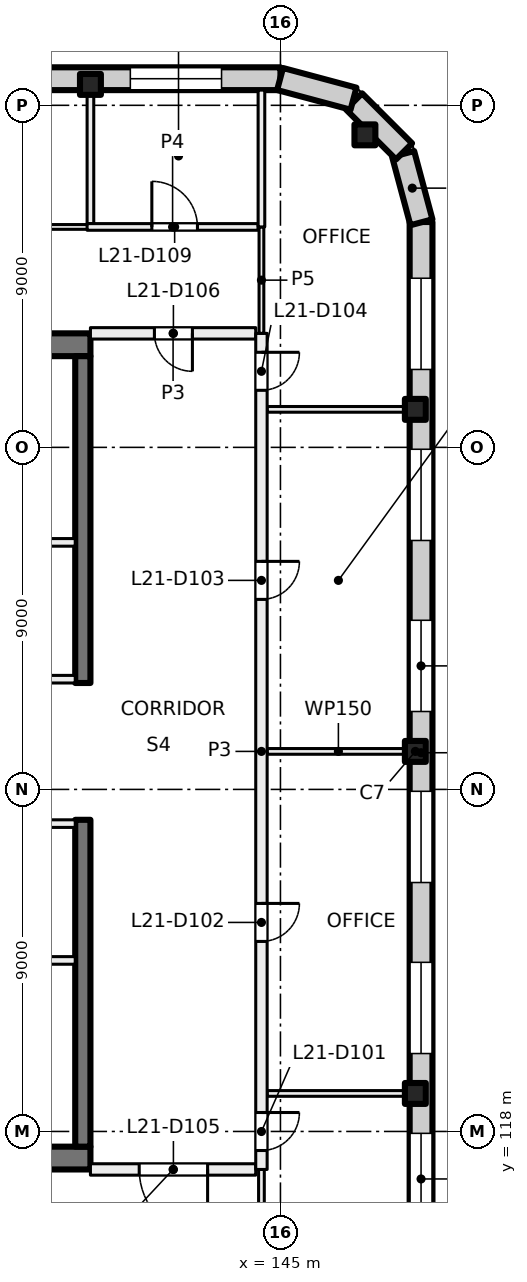
"""IFC4 building model, lengths in metres.
Left out: names, types, materials, properties, quantities, classifications, styles, units other than length and angle.
Written with IfcOpenShell. Run it as: python <this file> out.ifc"""

import sys

from ifc_helpers import new_model, si_unit, direction, frame, frame_2d, origin, origin_2d, place, context, subcontext, project, spatial, rectangle, extrude, element, fill, save


model = new_model("IFC4")
c1 = context("Model", 3, precision=1e-05, world=origin(), true_north=direction((0.0, 1.0)))
c2 = subcontext(c1, "Body", "Model", "MODEL_VIEW")
j1 = project(units=[si_unit("LENGTHUNIT", "METRE"), si_unit("PLANEANGLEUNIT", "RADIAN")], contexts=[c1])
p1 = place(None, origin())
s1 = spatial("IfcSite", under=j1, at=p1, CompositionType="ELEMENT")
p2 = place(p1, origin())
s2 = spatial("IfcBuilding", under=s1, at=p2, CompositionType="ELEMENT")
p3 = place(p2, frame((0.0, 0.0, 93.0)))
s3 = spatial("IfcBuildingStorey", under=s2, at=p3, CompositionType="ELEMENT", Elevation=93.0)
for number, where, z_axis, x_axis in (
    (1, (148.55, 119.0, 0.0), (0.0, 0.0, 1.0), (1.0, 0.0, 0.0)),
    (2, (148.55, 128.0, 0.0), (0.0, 0.0, 1.0), (1.0, 0.0, 0.0)),
    (3, (148.55, 137.0, 0.0), (0.0, 0.0, 1.0), (1.0, 0.0, 0.0)),
    (4, (140.0, 145.55, 0.0), (0.0, 0.0, 1.0), (1.0, 0.0, 0.0)),
    (5, (147.223, 144.223, 0.0), (0.0, 0.0, 1.0), (1.0, 0.0, 0.0)),
):
    element("IfcColumn", number, at=place(p3, frame(where, z_axis=z_axis, x_axis=x_axis)), inside=s3, PredefinedType="COLUMN", context=c2, shape_type="SweptSolid", body=[
        extrude(rectangle(XDim=0.55, YDim=0.55, at=origin_2d()), origin(), (0.0, 0.0, 1.0), 4.0),
    ])
for number, where, z_axis, x_axis in (
    (6, (135.4, 117.3, 0.0), (0.0, 0.0, 1.0), (1.0, 0.0, 0.0)),
    (7, (135.4, 138.7, 0.0), (0.0, 0.0, 1.0), (1.0, 0.0, 0.0)),
):
    element("IfcWall", number, at=place(p3, frame(where, z_axis=z_axis, x_axis=x_axis)), inside=s3, PredefinedType="SHEAR", context=c2, shape_type="SweptSolid", body=[
        extrude(rectangle(XDim=4.6, YDim=0.6, at=frame_2d((2.3, 0.0))), origin(), (0.0, 0.0, 1.0), 4.0),
    ])
for number, where, z_axis, x_axis in (
    (8, (139.8, 117.6, 0.0), (0.0, 0.0, 1.0), (0.0, 1.0, 0.0)),
    (9, (139.8, 129.8, 0.0), (0.0, 0.0, 1.0), (0.0, 1.0, 0.0)),
):
    element("IfcWall", number, at=place(p3, frame(where, z_axis=z_axis, x_axis=x_axis)), inside=s3, PredefinedType="SHEAR", context=c2, shape_type="SweptSolid", body=[
        extrude(rectangle(XDim=8.6, YDim=0.4, at=frame_2d((4.3, 0.0))), origin(), (0.0, 0.0, 1.0), 4.0),
    ])
p4 = place(p3, frame((131.07, 145.7, 0.0), z_axis=(0.0, 0.0, 1.0), x_axis=(1.0, 0.0, 0.0)))
e10 = element("IfcWall", 10, at=p4, inside=s3, PredefinedType="SOLIDWALL", context=c2, shape_type="SweptSolid", body=[
    extrude(rectangle(XDim=13.93, YDim=0.6, at=frame_2d((6.965, 0.0))), origin(), (0.0, 0.0, 1.0), 3.625),
])
p5 = place(p4, frame((0.98, 0.0, 0.9)))
e11 = element("IfcOpeningElement", 11, at=p5, cuts=e10, PredefinedType="OPENING", context=c2, shape_type="SweptSolid", body=[
    extrude(rectangle(XDim=2.4, YDim=2.4, at=frame_2d((1.2, 1.2))), frame((0.0, 0.31, 0.0), z_axis=(0.0, -1.0, 0.0), x_axis=(1.0, 0.0, 0.0)), (0.0, 0.0, 1.0), 0.62),
])
p6 = place(p4, frame((5.48, 0.0, 0.9)))
e12 = element("IfcOpeningElement", 12, at=p6, cuts=e10, PredefinedType="OPENING", context=c2, shape_type="SweptSolid", body=[
    extrude(rectangle(XDim=2.4, YDim=2.4, at=frame_2d((1.2, 1.2))), frame((0.0, 0.31, 0.0), z_axis=(0.0, -1.0, 0.0), x_axis=(1.0, 0.0, 0.0)), (0.0, 0.0, 1.0), 0.62),
])
p7 = place(p4, frame((9.98, 0.0, 0.9)))
e13 = element("IfcOpeningElement", 13, at=p7, cuts=e10, PredefinedType="OPENING", context=c2, shape_type="SweptSolid", body=[
    extrude(rectangle(XDim=2.4, YDim=2.4, at=frame_2d((1.2, 1.2))), frame((0.0, 0.31, 0.0), z_axis=(0.0, -1.0, 0.0), x_axis=(1.0, 0.0, 0.0)), (0.0, 0.0, 1.0), 0.62),
])
p8 = place(p3, frame((148.7, 141.93, 0.0), z_axis=(0.0, 0.0, 1.0), x_axis=(0.0, -1.0, 0.0)))
e14 = element("IfcWall", 14, at=p8, inside=s3, PredefinedType="SOLIDWALL", context=c2, shape_type="SweptSolid", body=[
    extrude(rectangle(XDim=27.93, YDim=0.6, at=frame_2d((13.965, 0.0))), origin(), (0.0, 0.0, 1.0), 3.625),
])
p9 = place(p8, frame((1.48, 0.0, 0.9)))
e15 = element("IfcOpeningElement", 15, at=p9, cuts=e14, PredefinedType="OPENING", context=c2, shape_type="SweptSolid", body=[
    extrude(rectangle(XDim=2.4, YDim=2.4, at=frame_2d((1.2, 1.2))), frame((0.0, 0.31, 0.0), z_axis=(0.0, -1.0, 0.0), x_axis=(1.0, 0.0, 0.0)), (0.0, 0.0, 1.0), 0.62),
])
p10 = place(p8, frame((5.98, 0.0, 0.9)))
e16 = element("IfcOpeningElement", 16, at=p10, cuts=e14, PredefinedType="OPENING", context=c2, shape_type="SweptSolid", body=[
    extrude(rectangle(XDim=2.4, YDim=2.4, at=frame_2d((1.2, 1.2))), frame((0.0, 0.31, 0.0), z_axis=(0.0, -1.0, 0.0), x_axis=(1.0, 0.0, 0.0)), (0.0, 0.0, 1.0), 0.62),
])
p11 = place(p8, frame((10.48, 0.0, 0.9)))
e17 = element("IfcOpeningElement", 17, at=p11, cuts=e14, PredefinedType="OPENING", context=c2, shape_type="SweptSolid", body=[
    extrude(rectangle(XDim=2.4, YDim=2.4, at=frame_2d((1.2, 1.2))), frame((0.0, 0.31, 0.0), z_axis=(0.0, -1.0, 0.0), x_axis=(1.0, 0.0, 0.0)), (0.0, 0.0, 1.0), 0.62),
])
p12 = place(p8, frame((14.98, 0.0, 0.9)))
e18 = element("IfcOpeningElement", 18, at=p12, cuts=e14, PredefinedType="OPENING", context=c2, shape_type="SweptSolid", body=[
    extrude(rectangle(XDim=2.4, YDim=2.4, at=frame_2d((1.2, 1.2))), frame((0.0, 0.31, 0.0), z_axis=(0.0, -1.0, 0.0), x_axis=(1.0, 0.0, 0.0)), (0.0, 0.0, 1.0), 0.62),
])
p13 = place(p8, frame((19.48, 0.0, 0.9)))
e19 = element("IfcOpeningElement", 19, at=p13, cuts=e14, PredefinedType="OPENING", context=c2, shape_type="SweptSolid", body=[
    extrude(rectangle(XDim=2.4, YDim=2.4, at=frame_2d((1.2, 1.2))), frame((0.0, 0.31, 0.0), z_axis=(0.0, -1.0, 0.0), x_axis=(1.0, 0.0, 0.0)), (0.0, 0.0, 1.0), 0.62),
])
p14 = place(p8, frame((23.98, 0.0, 0.9)))
e20 = element("IfcOpeningElement", 20, at=p14, cuts=e14, PredefinedType="OPENING", context=c2, shape_type="SweptSolid", body=[
    extrude(rectangle(XDim=2.4, YDim=2.4, at=frame_2d((1.2, 1.2))), frame((0.0, 0.31, 0.0), z_axis=(0.0, -1.0, 0.0), x_axis=(1.0, 0.0, 0.0)), (0.0, 0.0, 1.0), 0.62),
])
for number, where, z_axis, x_axis in (
    (21, (148.229, 143.719, 0.0), (0.0, 0.0, 1.0), (0.259, -0.966, 0.0)),
    (22, (146.936, 145.104, 0.0), (0.0, 0.0, 1.0), (0.707, -0.707, 0.0)),
):
    element("IfcWall", number, at=place(p3, frame(where, z_axis=z_axis, x_axis=x_axis)), inside=s3, PredefinedType="SOLIDWALL", context=c2, shape_type="SweptSolid", body=[
        extrude(rectangle(XDim=1.861, YDim=0.6, at=frame_2d((0.93, 0.0))), origin(), (0.0, 0.0, 1.0), 3.625),
    ])
p15 = place(p3, frame((144.99, 145.692, 0.0), z_axis=(0.0, 0.0, 1.0), x_axis=(0.965920269068, -0.258839784042, 0.0)))
e23 = element("IfcWall", 23, at=p15, inside=s3, PredefinedType="SOLIDWALL", context=c2, shape_type="SweptSolid", body=[
    extrude(rectangle(XDim=2.0, YDim=0.6, at=frame_2d((1.0, 0.0))), origin(), (0.0, 0.0, 1.0), 3.625),
])
p16 = place(p3, frame((135.0, 129.9, 0.0), z_axis=(0.0, 0.0, 1.0), x_axis=(1.0, 0.0, 0.0)))
e24 = element("IfcWall", 24, at=p16, inside=s3, PredefinedType="PARTITIONING", context=c2, shape_type="SweptSolid", body=[
    extrude(rectangle(XDim=4.6, YDim=0.2, at=frame_2d((2.3, 0.0))), origin(), (0.0, 0.0, 1.0), 3.625),
])
p17 = place(p16, frame((1.7, 0.0, 0.0)))
e25 = element("IfcOpeningElement", 25, at=p17, cuts=e24, PredefinedType="OPENING", context=c2, shape_type="SweptSolid", body=[
    extrude(rectangle(XDim=1.2, YDim=2.1, at=frame_2d((0.6, 1.05))), frame((0.0, 0.11, 0.0), z_axis=(0.0, -1.0, 0.0), x_axis=(1.0, 0.0, 0.0)), (0.0, 0.0, 1.0), 0.22),
])
p18 = place(p3, frame((135.0, 133.5, 0.0), z_axis=(0.0, 0.0, 1.0), x_axis=(1.0, 0.0, 0.0)))
e26 = element("IfcWall", 26, at=p18, inside=s3, PredefinedType="PARTITIONING", context=c2, shape_type="SweptSolid", body=[
    extrude(rectangle(XDim=4.6, YDim=0.2, at=frame_2d((2.3, 0.0))), origin(), (0.0, 0.0, 1.0), 3.625),
])
p19 = place(p18, frame((1.75, 0.0, 0.0)))
e27 = element("IfcOpeningElement", 27, at=p19, cuts=e26, PredefinedType="OPENING", context=c2, shape_type="SweptSolid", body=[
    extrude(rectangle(XDim=1.5, YDim=2.1, at=frame_2d((0.75, 1.05))), frame((0.0, 0.11, 0.0), z_axis=(0.0, -1.0, 0.0), x_axis=(1.0, 0.0, 0.0)), (0.0, 0.0, 1.0), 0.22),
])
p20 = place(p3, frame((139.6, 126.1, 0.0), z_axis=(0.0, 0.0, 1.0), x_axis=(-1.0, 0.0, 0.0)))
e28 = element("IfcWall", 28, at=p20, inside=s3, PredefinedType="PARTITIONING", context=c2, shape_type="SweptSolid", body=[
    extrude(rectangle(XDim=4.6, YDim=0.2, at=frame_2d((2.3, 0.0))), origin(), (0.0, 0.0, 1.0), 3.625),
])
p21 = place(p20, frame((1.7, 0.0, 0.0)))
e29 = element("IfcOpeningElement", 29, at=p21, cuts=e28, PredefinedType="OPENING", context=c2, shape_type="SweptSolid", body=[
    extrude(rectangle(XDim=1.2, YDim=2.1, at=frame_2d((0.6, 1.05))), frame((0.0, 0.11, 0.0), z_axis=(0.0, -1.0, 0.0), x_axis=(1.0, 0.0, 0.0)), (0.0, 0.0, 1.0), 0.22),
])
p22 = place(p3, frame((139.6, 122.5, 0.0), z_axis=(0.0, 0.0, 1.0), x_axis=(-1.0, 0.0, 0.0)))
e30 = element("IfcWall", 30, at=p22, inside=s3, PredefinedType="PARTITIONING", context=c2, shape_type="SweptSolid", body=[
    extrude(rectangle(XDim=4.6, YDim=0.2, at=frame_2d((2.3, 0.0))), origin(), (0.0, 0.0, 1.0), 3.625),
])
p23 = place(p22, frame((1.35, 0.0, 0.0)))
e31 = element("IfcOpeningElement", 31, at=p23, cuts=e30, PredefinedType="OPENING", context=c2, shape_type="SweptSolid", body=[
    extrude(rectangle(XDim=1.5, YDim=2.1, at=frame_2d((0.75, 1.05))), frame((0.0, 0.11, 0.0), z_axis=(0.0, -1.0, 0.0), x_axis=(1.0, 0.0, 0.0)), (0.0, 0.0, 1.0), 0.22),
])
p24 = place(p3, frame((131.085, 141.8, 0.0), z_axis=(0.0, 0.0, 1.0), x_axis=(1.0, 0.0, 0.0)))
e32 = element("IfcWall", 32, at=p24, inside=s3, PredefinedType="PARTITIONING", context=c2, shape_type="SweptSolid", body=[
    extrude(rectangle(XDim=8.918, YDim=0.125, at=frame_2d((4.459, 0.0))), origin(), (0.0, 0.0, 1.0), 3.625),
])
p25 = place(p24, frame((6.165, 0.0, 0.0)))
e33 = element("IfcOpeningElement", 33, at=p25, cuts=e32, PredefinedType="OPENING", context=c2, shape_type="SweptSolid", body=[
    extrude(rectangle(XDim=1.0, YDim=2.1, at=frame_2d((0.5, 1.05))), frame((0.0, 0.073, 0.0), z_axis=(0.0, -1.0, 0.0), x_axis=(1.0, 0.0, 0.0)), (0.0, 0.0, 1.0), 0.145),
])
p26 = place(p24, frame((1.798, 0.0, 0.0)))
e34 = element("IfcOpeningElement", 34, at=p26, cuts=e32, PredefinedType="OPENING", context=c2, shape_type="SweptSolid", body=[
    extrude(rectangle(XDim=0.8, YDim=2.1, at=frame_2d((0.4, 1.05))), frame((0.0, 0.073, 0.0), z_axis=(0.0, -1.0, 0.0), x_axis=(1.0, 0.0, 0.0)), (0.0, 0.0, 1.0), 0.145),
])
p27 = place(p3, frame((144.35, 139.0, 0.0), z_axis=(0.0, 0.0, 1.0), x_axis=(-1.0, 0.0, 0.0)))
e35 = element("IfcWall", 35, at=p27, inside=s3, PredefinedType="PARTITIONING", context=c2, shape_type="SweptSolid", body=[
    extrude(rectangle(XDim=4.35, YDim=0.3, at=frame_2d((2.175, 0.0))), origin(), (0.0, 0.0, 1.0), 3.625),
])
p28 = place(p27, frame((1.667, 0.0, 0.0)))
e36 = element("IfcOpeningElement", 36, at=p28, cuts=e35, PredefinedType="OPENING", context=c2, shape_type="SweptSolid", body=[
    extrude(rectangle(XDim=1.0, YDim=2.1, at=frame_2d((0.5, 1.05))), frame((0.0, 0.16, 0.0), z_axis=(0.0, -1.0, 0.0), x_axis=(1.0, 0.0, 0.0)), (0.0, 0.0, 1.0), 0.32),
])
p29 = place(p3, frame((140.0, 141.888, 0.0), z_axis=(0.0, 0.0, 1.0), x_axis=(0.0, 1.0, 0.0)))
e37 = element("IfcWall", 37, at=p29, inside=s3, PredefinedType="PARTITIONING", context=c2, shape_type="SweptSolid", body=[
    extrude(rectangle(XDim=3.512, YDim=0.175, at=frame_2d((1.756, 0.0))), origin(), (0.0, 0.0, 1.0), 3.625),
])
p30 = place(p3, frame((139.912, 141.8, 0.0), z_axis=(0.0, 0.0, 1.0), x_axis=(1.0, 0.0, 0.0)))
e38 = element("IfcWall", 38, at=p30, inside=s3, PredefinedType="PARTITIONING", context=c2, shape_type="SweptSolid", body=[
    extrude(rectangle(XDim=4.5, YDim=0.175, at=frame_2d((2.25, 0.0))), origin(), (0.0, 0.0, 1.0), 3.625),
])
p31 = place(p30, frame((1.704, 0.0, 0.0)))
e39 = element("IfcOpeningElement", 39, at=p31, cuts=e38, PredefinedType="OPENING", context=c2, shape_type="SweptSolid", body=[
    extrude(rectangle(XDim=1.2, YDim=2.1, at=frame_2d((0.6, 1.05))), frame((0.0, 0.097, 0.0), z_axis=(0.0, -1.0, 0.0), x_axis=(1.0, 0.0, 0.0)), (0.0, 0.0, 1.0), 0.195),
])
p32 = place(p3, frame((144.35, 117.0, 0.0), z_axis=(0.0, 0.0, 1.0), x_axis=(-1.0, 0.0, 0.0)))
e40 = element("IfcWall", 40, at=p32, inside=s3, PredefinedType="PARTITIONING", context=c2, shape_type="SweptSolid", body=[
    extrude(rectangle(XDim=4.35, YDim=0.3, at=frame_2d((2.175, 0.0))), origin(), (0.0, 0.0, 1.0), 3.625),
])
p33 = place(p32, frame((1.267, 0.0, 0.0)))
e41 = element("IfcOpeningElement", 41, at=p33, cuts=e40, PredefinedType="OPENING", context=c2, shape_type="SweptSolid", body=[
    extrude(rectangle(XDim=1.8, YDim=2.1, at=frame_2d((0.9, 1.05))), frame((0.0, 0.16, 0.0), z_axis=(0.0, -1.0, 0.0), x_axis=(1.0, 0.0, 0.0)), (0.0, 0.0, 1.0), 0.32),
])
p34 = place(p3, frame((144.5, 117.0, 0.0), z_axis=(0.0, 0.0, 1.0), x_axis=(0.0, -1.0, 0.0)))
e42 = element("IfcWall", 42, at=p34, inside=s3, PredefinedType="PARTITIONING", context=c2, shape_type="SweptSolid", body=[
    extrude(rectangle(XDim=6.4, YDim=0.15, at=frame_2d((3.2, 0.0))), origin(), (0.0, 0.0, 1.0), 3.625),
])
for number, where, z_axis, x_axis in (
    (43, (144.65, 119.0, 0.0), (0.0, 0.0, 1.0), (1.0, 0.0, 0.0)),
    (44, (144.65, 128.0, 0.0), (0.0, 0.0, 1.0), (1.0, 0.0, 0.0)),
    (45, (144.65, 137.0, 0.0), (0.0, 0.0, 1.0), (1.0, 0.0, 0.0)),
):
    element("IfcWall", number, at=place(p3, frame(where, z_axis=z_axis, x_axis=x_axis)), inside=s3, PredefinedType="PARTITIONING", context=c2, shape_type="SweptSolid", body=[
        extrude(rectangle(XDim=3.75, YDim=0.15, at=frame_2d((1.875, 0.0))), origin(), (0.0, 0.0, 1.0), 3.625),
    ])
p35 = place(p3, frame((144.5, 139.0, 0.0), z_axis=(0.0, 0.0, 1.0), x_axis=(0.0, -1.0, 0.0)))
e46 = element("IfcWall", 46, at=p35, inside=s3, PredefinedType="PARTITIONING", context=c2, shape_type="SweptSolid", body=[
    extrude(rectangle(XDim=22.0, YDim=0.3, at=frame_2d((11.0, 0.0))), origin(), (0.0, 0.0, 1.0), 3.625),
])
p36 = place(p35, frame((20.501, 0.0, 0.0)))
e47 = element("IfcOpeningElement", 47, at=p36, cuts=e46, PredefinedType="OPENING", context=c2, shape_type="SweptSolid", body=[
    extrude(rectangle(XDim=1.0, YDim=2.1, at=frame_2d((0.5, 1.05))), frame((0.0, 0.16, 0.0), z_axis=(0.0, -1.0, 0.0), x_axis=(1.0, 0.0, 0.0)), (0.0, 0.0, 1.0), 0.32),
])
p37 = place(p35, frame((15.0, 0.0, 0.0)))
e48 = element("IfcOpeningElement", 48, at=p37, cuts=e46, PredefinedType="OPENING", context=c2, shape_type="SweptSolid", body=[
    extrude(rectangle(XDim=1.0, YDim=2.1, at=frame_2d((0.5, 1.05))), frame((0.0, 0.16, 0.0), z_axis=(0.0, -1.0, 0.0), x_axis=(1.0, 0.0, 0.0)), (0.0, 0.0, 1.0), 0.32),
])
p38 = place(p35, frame((6.0, 0.0, 0.0)))
e49 = element("IfcOpeningElement", 49, at=p38, cuts=e46, PredefinedType="OPENING", context=c2, shape_type="SweptSolid", body=[
    extrude(rectangle(XDim=1.0, YDim=2.1, at=frame_2d((0.5, 1.05))), frame((0.0, 0.16, 0.0), z_axis=(0.0, -1.0, 0.0), x_axis=(1.0, 0.0, 0.0)), (0.0, 0.0, 1.0), 0.32),
])
p39 = place(p35, frame((0.499, 0.0, 0.0)))
e50 = element("IfcOpeningElement", 50, at=p39, cuts=e46, PredefinedType="OPENING", context=c2, shape_type="SweptSolid", body=[
    extrude(rectangle(XDim=1.0, YDim=2.1, at=frame_2d((0.5, 1.05))), frame((0.0, 0.16, 0.0), z_axis=(0.0, -1.0, 0.0), x_axis=(1.0, 0.0, 0.0)), (0.0, 0.0, 1.0), 0.32),
])
p40 = place(p3, frame((144.5, 141.8, 0.0), z_axis=(0.0, 0.0, 1.0), x_axis=(0.0, -1.0, 0.0)))
e51 = element("IfcWall", 51, at=p40, inside=s3, PredefinedType="PARTITIONING", context=c2, shape_type="SweptSolid", body=[
    extrude(rectangle(XDim=2.8, YDim=0.125, at=frame_2d((1.4, 0.0))), origin(), (0.0, 0.0, 1.0), 3.625),
])
p41 = place(p3, frame((144.5, 141.8, 0.0), z_axis=(0.0, 0.0, 1.0), x_axis=(0.0, 1.0, 0.0)))
e52 = element("IfcWall", 52, at=p41, inside=s3, PredefinedType="PARTITIONING", context=c2, shape_type="SweptSolid", body=[
    extrude(rectangle(XDim=3.6, YDim=0.175, at=frame_2d((1.8, 0.0))), origin(), (0.0, 0.0, 1.0), 3.625),
])
p42 = place(p7, origin())
e53 = element("IfcWindow", 53, at=p42, inside=s3, PartitioningType="SINGLE_PANEL", PredefinedType="WINDOW", context=c2, shape_type="SweptSolid", body=[
    extrude(rectangle(XDim=2.4, YDim=2.4, at=frame_2d((1.2, 1.2))), frame((0.0, 0.03, 0.0), z_axis=(0.0, -1.0, 0.0), x_axis=(1.0, 0.0, 0.0)), (0.0, 0.0, 1.0), 0.06),
])
fill(e13, e53)
p43 = place(p9, origin())
e54 = element("IfcWindow", 54, at=p43, inside=s3, PartitioningType="SINGLE_PANEL", PredefinedType="WINDOW", context=c2, shape_type="SweptSolid", body=[
    extrude(rectangle(XDim=2.4, YDim=2.4, at=frame_2d((1.2, 1.2))), frame((0.0, 0.03, 0.0), z_axis=(0.0, -1.0, 0.0), x_axis=(1.0, 0.0, 0.0)), (0.0, 0.0, 1.0), 0.06),
])
fill(e15, e54)
p44 = place(p10, origin())
e55 = element("IfcWindow", 55, at=p44, inside=s3, PartitioningType="SINGLE_PANEL", PredefinedType="WINDOW", context=c2, shape_type="SweptSolid", body=[
    extrude(rectangle(XDim=2.4, YDim=2.4, at=frame_2d((1.2, 1.2))), frame((0.0, 0.03, 0.0), z_axis=(0.0, -1.0, 0.0), x_axis=(1.0, 0.0, 0.0)), (0.0, 0.0, 1.0), 0.06),
])
fill(e16, e55)
p45 = place(p11, origin())
e56 = element("IfcWindow", 56, at=p45, inside=s3, PartitioningType="SINGLE_PANEL", PredefinedType="WINDOW", context=c2, shape_type="SweptSolid", body=[
    extrude(rectangle(XDim=2.4, YDim=2.4, at=frame_2d((1.2, 1.2))), frame((0.0, 0.03, 0.0), z_axis=(0.0, -1.0, 0.0), x_axis=(1.0, 0.0, 0.0)), (0.0, 0.0, 1.0), 0.06),
])
fill(e17, e56)
p46 = place(p12, origin())
e57 = element("IfcWindow", 57, at=p46, inside=s3, PartitioningType="SINGLE_PANEL", PredefinedType="WINDOW", context=c2, shape_type="SweptSolid", body=[
    extrude(rectangle(XDim=2.4, YDim=2.4, at=frame_2d((1.2, 1.2))), frame((0.0, 0.03, 0.0), z_axis=(0.0, -1.0, 0.0), x_axis=(1.0, 0.0, 0.0)), (0.0, 0.0, 1.0), 0.06),
])
fill(e18, e57)
p47 = place(p13, origin())
e58 = element("IfcWindow", 58, at=p47, inside=s3, PartitioningType="SINGLE_PANEL", PredefinedType="WINDOW", context=c2, shape_type="SweptSolid", body=[
    extrude(rectangle(XDim=2.4, YDim=2.4, at=frame_2d((1.2, 1.2))), frame((0.0, 0.03, 0.0), z_axis=(0.0, -1.0, 0.0), x_axis=(1.0, 0.0, 0.0)), (0.0, 0.0, 1.0), 0.06),
])
fill(e19, e58)
p48 = place(p14, origin())
e59 = element("IfcWindow", 59, at=p48, inside=s3, PartitioningType="SINGLE_PANEL", PredefinedType="WINDOW", context=c2, shape_type="SweptSolid", body=[
    extrude(rectangle(XDim=2.4, YDim=2.4, at=frame_2d((1.2, 1.2))), frame((0.0, 0.03, 0.0), z_axis=(0.0, -1.0, 0.0), x_axis=(1.0, 0.0, 0.0)), (0.0, 0.0, 1.0), 0.06),
])
fill(e20, e59)
p49 = place(p36, origin())
e60 = element("IfcDoor", 60, at=p49, inside=s3, OperationType="SINGLE_SWING_LEFT", PredefinedType="DOOR", context=c2, shape_type="SweptSolid", body=[
    extrude(rectangle(XDim=1.0, YDim=2.1, at=frame_2d((0.5, 1.05))), frame((0.0, 0.025, 0.0), z_axis=(0.0, -1.0, 0.0), x_axis=(1.0, 0.0, 0.0)), (0.0, 0.0, 1.0), 0.05),
])
fill(e47, e60)
p50 = place(p37, origin())
e61 = element("IfcDoor", 61, at=p50, inside=s3, OperationType="SINGLE_SWING_LEFT", PredefinedType="DOOR", context=c2, shape_type="SweptSolid", body=[
    extrude(rectangle(XDim=1.0, YDim=2.1, at=frame_2d((0.5, 1.05))), frame((0.0, 0.025, 0.0), z_axis=(0.0, -1.0, 0.0), x_axis=(1.0, 0.0, 0.0)), (0.0, 0.0, 1.0), 0.05),
])
fill(e48, e61)
p51 = place(p38, origin())
e62 = element("IfcDoor", 62, at=p51, inside=s3, OperationType="SINGLE_SWING_LEFT", PredefinedType="DOOR", context=c2, shape_type="SweptSolid", body=[
    extrude(rectangle(XDim=1.0, YDim=2.1, at=frame_2d((0.5, 1.05))), frame((0.0, 0.025, 0.0), z_axis=(0.0, -1.0, 0.0), x_axis=(1.0, 0.0, 0.0)), (0.0, 0.0, 1.0), 0.05),
])
fill(e49, e62)
p52 = place(p39, origin())
e63 = element("IfcDoor", 63, at=p52, inside=s3, OperationType="SINGLE_SWING_LEFT", PredefinedType="DOOR", context=c2, shape_type="SweptSolid", body=[
    extrude(rectangle(XDim=1.0, YDim=2.1, at=frame_2d((0.5, 1.05))), frame((0.0, 0.025, 0.0), z_axis=(0.0, -1.0, 0.0), x_axis=(1.0, 0.0, 0.0)), (0.0, 0.0, 1.0), 0.05),
])
fill(e50, e63)
p53 = place(p33, origin())
e64 = element("IfcDoor", 64, at=p53, inside=s3, OperationType="DOUBLE_DOOR_SINGLE_SWING", PredefinedType="DOOR", context=c2, shape_type="SweptSolid", body=[
    extrude(rectangle(XDim=1.8, YDim=2.1, at=frame_2d((0.9, 1.05))), frame((0.0, 0.025, 0.0), z_axis=(0.0, -1.0, 0.0), x_axis=(1.0, 0.0, 0.0)), (0.0, 0.0, 1.0), 0.05),
])
fill(e41, e64)
p54 = place(p28, origin())
e65 = element("IfcDoor", 65, at=p54, inside=s3, OperationType="SINGLE_SWING_LEFT", PredefinedType="DOOR", context=c2, shape_type="SweptSolid", body=[
    extrude(rectangle(XDim=1.0, YDim=2.1, at=frame_2d((0.5, 1.05))), frame((0.0, 0.025, 0.0), z_axis=(0.0, -1.0, 0.0), x_axis=(1.0, 0.0, 0.0)), (0.0, 0.0, 1.0), 0.05),
])
fill(e36, e65)
p55 = place(p31, origin())
e66 = element("IfcDoor", 66, at=p55, inside=s3, OperationType="DOUBLE_DOOR_SINGLE_SWING", PredefinedType="DOOR", context=c2, shape_type="SweptSolid", body=[
    extrude(rectangle(XDim=1.2, YDim=2.1, at=frame_2d((0.6, 1.05))), frame((0.0, 0.025, 0.0), z_axis=(0.0, -1.0, 0.0), x_axis=(1.0, 0.0, 0.0)), (0.0, 0.0, 1.0), 0.05),
])
fill(e39, e66)
save(model, sys.argv[1])
